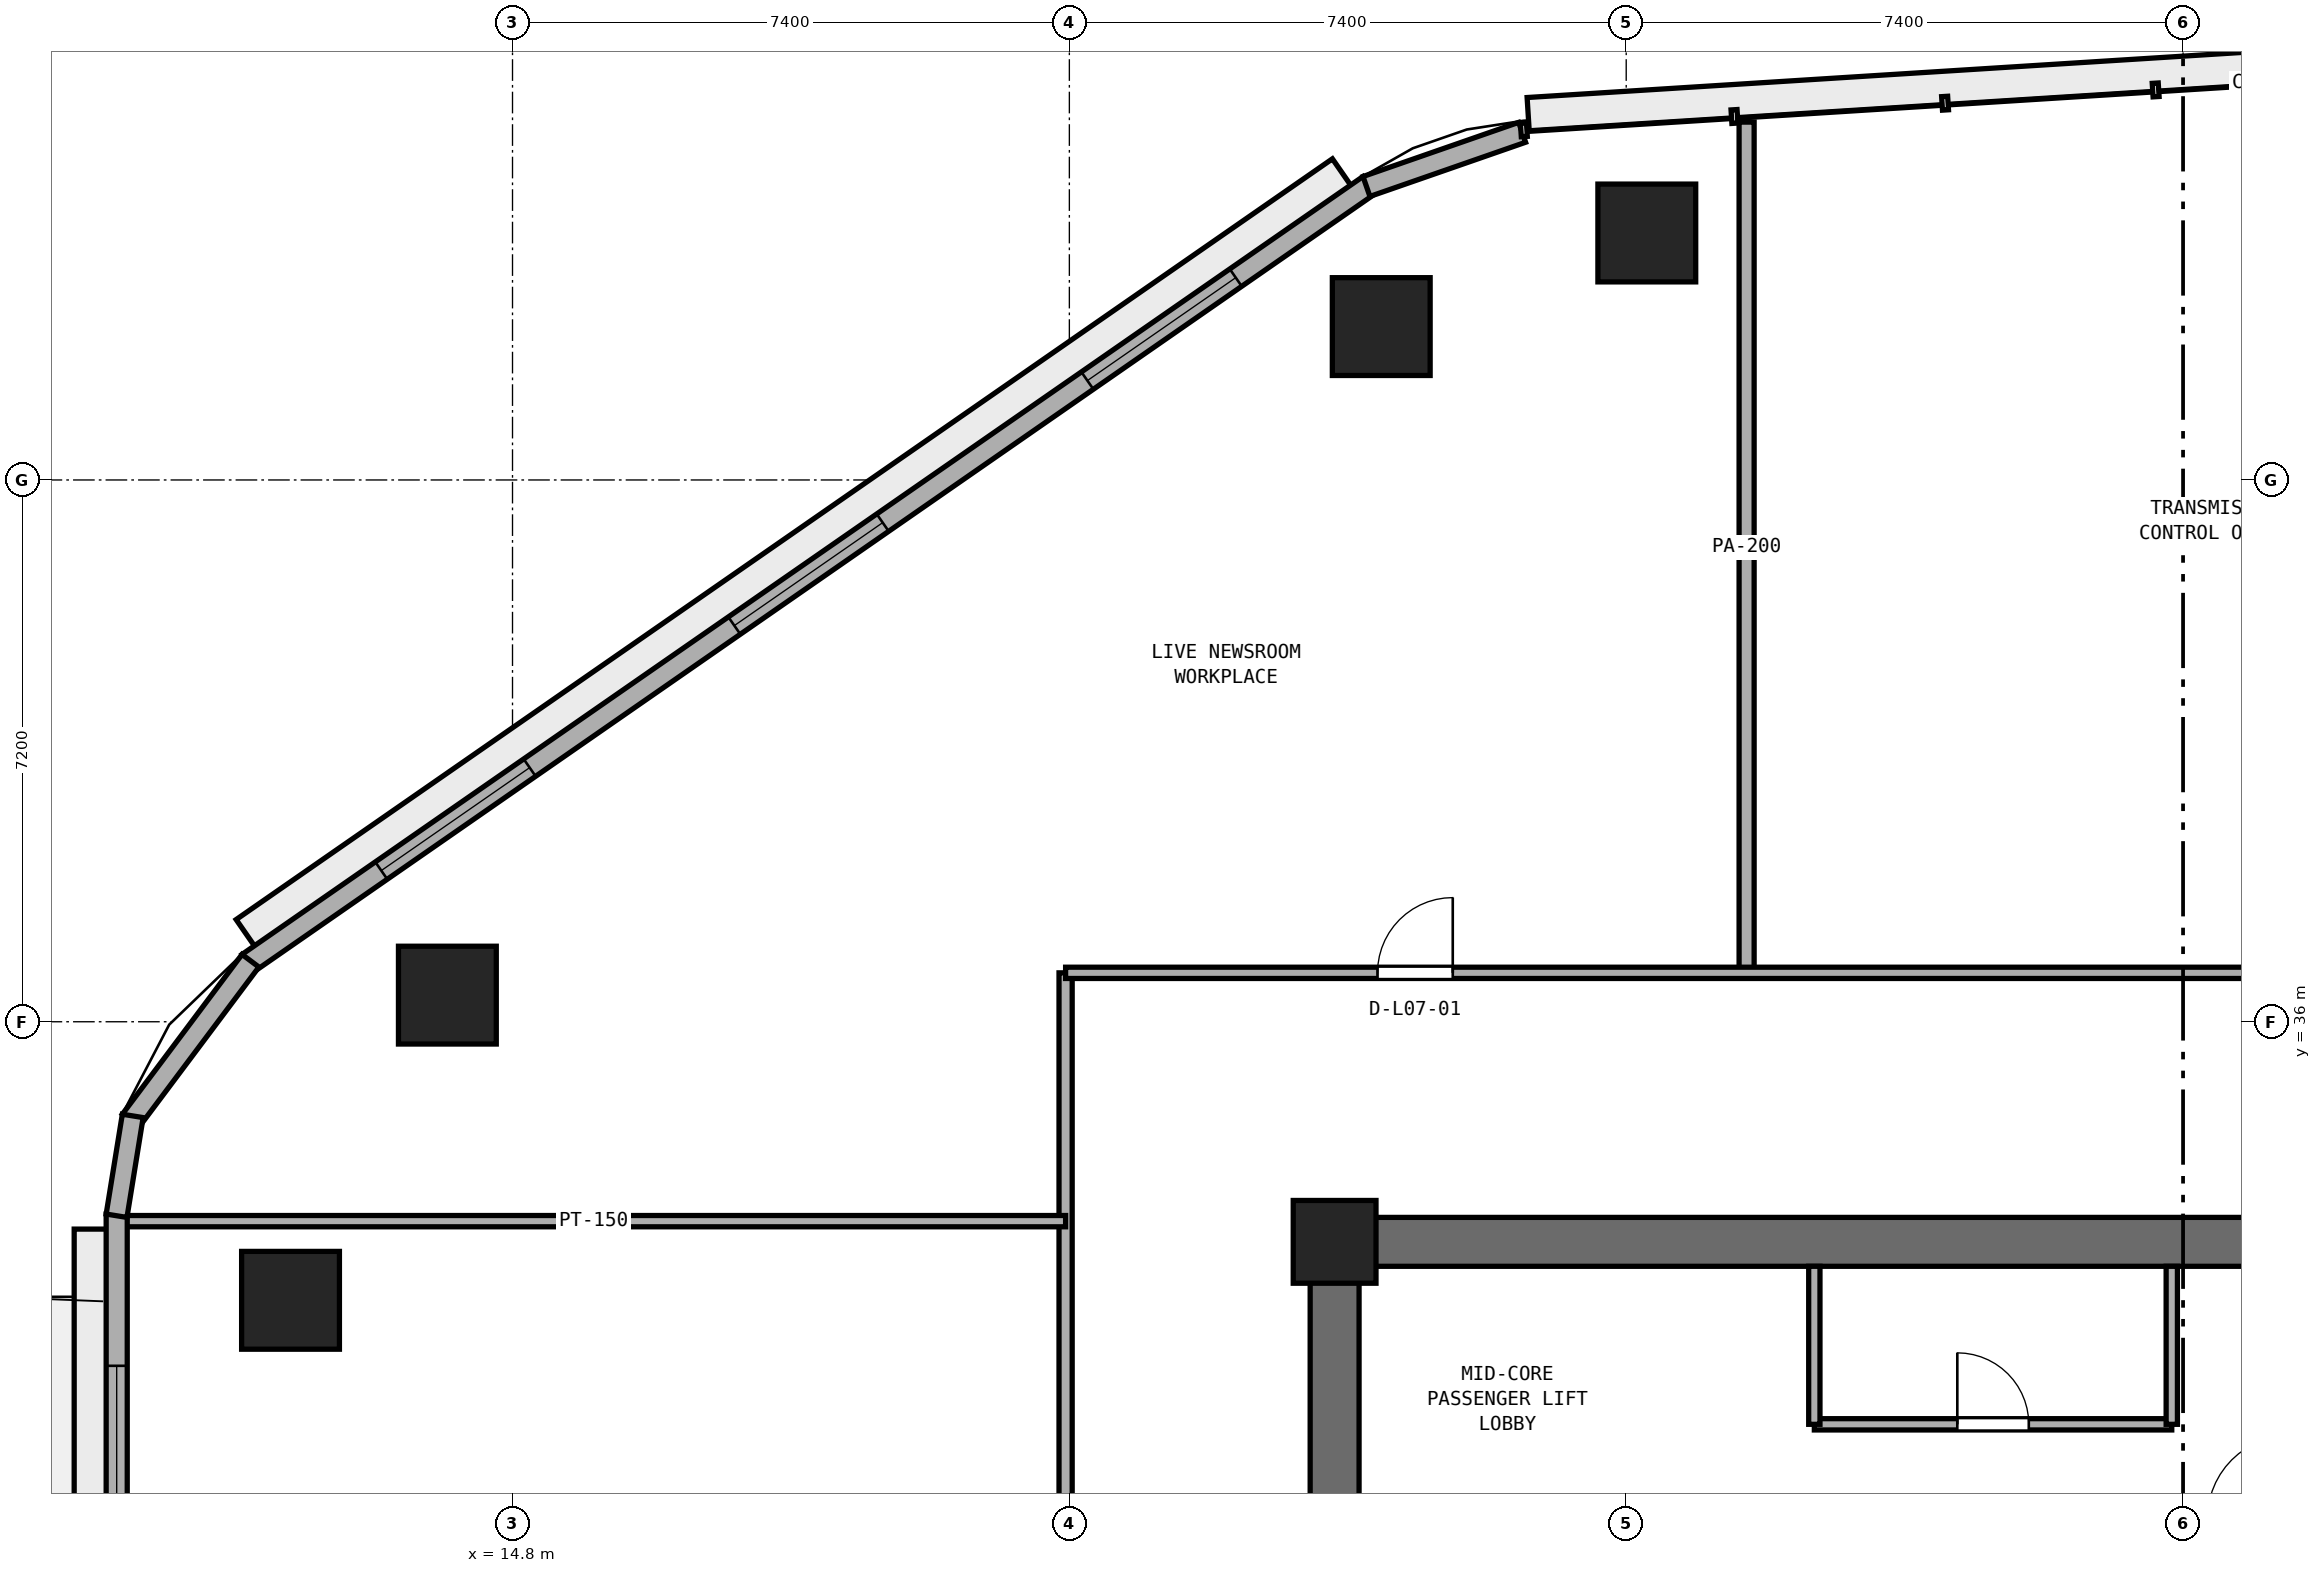
"""IFC4 building model, lengths in metres.
Left out: names, types, materials, properties, quantities, classifications, styles, units other than length and angle.
Written with IfcOpenShell. Run it as: python <this file> out.ifc"""

import sys

from ifc_helpers import new_model, si_unit, direction, frame, frame_2d, origin, origin_2d, place, context, subcontext, project, spatial, rectangle, extrude, element, fill, save


model = new_model("IFC4")
c1 = context("Model", 3, precision=1e-05, world=origin(), true_north=direction((0.0, 1.0)))
c2 = subcontext(c1, "Body", "Model", "MODEL_VIEW")
j1 = project(units=[si_unit("LENGTHUNIT", "METRE"), si_unit("PLANEANGLEUNIT", "RADIAN")], contexts=[c1])
p1 = place(None, origin())
s1 = spatial("IfcSite", under=j1, at=p1, CompositionType="ELEMENT")
p2 = place(p1, origin())
s2 = spatial("IfcBuilding", under=s1, at=p2, CompositionType="ELEMENT")
p3 = place(p2, frame((0.0, 0.0, 32.6)))
s3 = spatial("IfcBuildingStorey", under=s2, at=p3, CompositionType="ELEMENT", Elevation=32.6)
p4 = place(p3, frame((25.4, 33.075, 0.0), z_axis=(0.0, 0.0, 1.0), x_axis=(1.0, 0.0, 0.0)))
e1 = element("IfcWall", 1, at=p4, inside=s3, PredefinedType="SHEAR", context=c2, shape_type="SweptSolid", body=[
    extrude(rectangle(XDim=23.2, YDim=0.65, at=frame_2d((11.6, 0.0))), origin(), (0.0, 0.0, 1.0), 3.525),
])
p5 = place(p3, frame((25.725, 17.65, 0.0), z_axis=(0.0, 0.0, 1.0), x_axis=(0.0, 1.0, 0.0)))
e2 = element("IfcWall", 2, at=p5, inside=s3, PredefinedType="SHEAR", context=c2, shape_type="SweptSolid", body=[
    extrude(rectangle(XDim=15.1, YDim=0.65, at=frame_2d((7.55, 0.0))), origin(), (0.0, 0.0, 1.0), 3.525),
])
p6 = place(p5, frame((6.8, 0.0, 0.0)))
e3 = element("IfcOpeningElement", 3, at=p6, cuts=e2, PredefinedType="OPENING", context=c2, shape_type="SweptSolid", body=[
    extrude(rectangle(XDim=1.5, YDim=2.15, at=frame_2d((0.75, 1.075))), frame((0.0, 0.335, 0.0), z_axis=(0.0, -1.0, 0.0), x_axis=(1.0, 0.0, 0.0)), (0.0, 0.0, 1.0), 0.67),
])
p7 = place(p3, frame((25.725, 33.075, 0.0), z_axis=(0.0, 0.0, 1.0), x_axis=(1.0, 0.0, 0.0)))
e4 = element("IfcColumn", 4, at=p7, inside=s3, PredefinedType="PILASTER", context=c2, shape_type="SweptSolid", body=[
    extrude(rectangle(XDim=1.1, YDim=1.1, at=origin_2d()), origin(), (0.0, 0.0, 1.0), 3.8),
])
for number, where, z_axis, x_axis in (
    (5, (29.874, 46.482, 0.0), (0.0, 0.0, 1.0), (1.0, 0.0, 0.0)),
    (6, (26.344, 45.238, 0.0), (0.0, 0.0, 1.0), (1.0, 0.0, 0.0)),
    (7, (13.934, 36.354, 0.0), (0.0, 0.0, 1.0), (1.0, 0.0, 0.0)),
    (8, (11.85, 32.298, 0.0), (0.0, 0.0, 1.0), (1.0, 0.0, 0.0)),
):
    element("IfcColumn", number, at=place(p3, frame(where, z_axis=z_axis, x_axis=x_axis)), inside=s3, PredefinedType="COLUMN", context=c2, shape_type="SweptSolid", body=[
        extrude(rectangle(XDim=1.3, YDim=1.3, at=origin_2d()), origin(), (0.0, 0.0, 1.0), 3.8),
    ])
p8 = place(p3, frame((32.1, 30.65, 0.0), z_axis=(0.0, 0.0, 1.0), x_axis=(1.0, 0.0, 0.0)))
e9 = element("IfcWall", 9, at=p8, inside=s3, PredefinedType="PARTITIONING", context=c2, shape_type="SweptSolid", body=[
    extrude(rectangle(XDim=4.75, YDim=0.15, at=frame_2d((2.375, 0.0))), origin(), (0.0, 0.0, 1.0), 3.525),
])
p9 = place(p8, frame((1.9, 0.0, 0.0)))
e10 = element("IfcOpeningElement", 10, at=p9, cuts=e9, PredefinedType="OPENING", context=c2, shape_type="SweptSolid", body=[
    extrude(rectangle(XDim=0.95, YDim=2.1, at=frame_2d((0.475, 1.05))), frame((0.0, 0.085, 0.0), z_axis=(0.0, -1.0, 0.0), x_axis=(1.0, 0.0, 0.0)), (0.0, 0.0, 1.0), 0.17),
])
for number, where, z_axis, x_axis in (
    (11, (32.1, 30.65, 0.0), (0.0, 0.0, 1.0), (0.0, 1.0, 0.0)),
    (12, (36.85, 30.65, 0.0), (0.0, 0.0, 1.0), (0.0, 1.0, 0.0)),
):
    element("IfcWall", number, at=place(p3, frame(where, z_axis=z_axis, x_axis=x_axis)), inside=s3, PredefinedType="PARTITIONING", context=c2, shape_type="SweptSolid", body=[
        extrude(rectangle(XDim=2.1, YDim=0.15, at=frame_2d((1.05, 0.0))), origin(), (0.0, 0.0, 1.0), 3.525),
    ])
p10 = place(p3, frame((31.2, 36.65, 0.0), z_axis=(0.0, 0.0, 1.0), x_axis=(0.0, 1.0, 0.0)))
e13 = element("IfcWall", 13, at=p10, inside=s3, PredefinedType="PARTITIONING", context=c2, shape_type="SweptSolid", body=[
    extrude(rectangle(XDim=11.306, YDim=0.2, at=frame_2d((5.653, 0.0))), origin(), (0.0, 0.0, 1.0), 3.525),
])
p11 = place(p3, frame((22.15, 5.798, 0.0), z_axis=(0.0, 0.0, 1.0), x_axis=(0.0, 1.0, 0.0)))
e14 = element("IfcWall", 14, at=p11, inside=s3, PredefinedType="PARTITIONING", context=c2, shape_type="SweptSolid", body=[
    extrude(rectangle(XDim=30.852, YDim=0.175, at=frame_2d((15.426, 0.0))), origin(), (0.0, 0.0, 1.0), 3.525),
])
p12 = place(p11, frame((17.302, 0.0, 0.0)))
e15 = element("IfcOpeningElement", 15, at=p12, cuts=e14, PredefinedType="OPENING", context=c2, shape_type="SweptSolid", body=[
    extrude(rectangle(XDim=0.9, YDim=2.1, at=frame_2d((0.45, 1.05))), frame((0.0, 0.097, 0.0), z_axis=(0.0, -1.0, 0.0), x_axis=(1.0, 0.0, 0.0)), (0.0, 0.0, 1.0), 0.195),
])
p13 = place(p3, frame((9.605, 33.35, 0.0), z_axis=(0.0, 0.0, 1.0), x_axis=(1.0, 0.0, 0.0)))
e16 = element("IfcWall", 16, at=p13, inside=s3, PredefinedType="PARTITIONING", context=c2, shape_type="SweptSolid", body=[
    extrude(rectangle(XDim=12.545, YDim=0.15, at=frame_2d((6.272, 0.0))), origin(), (0.0, 0.0, 1.0), 3.525),
])
p14 = place(p3, frame((22.15, 36.65, 0.0), z_axis=(0.0, 0.0, 1.0), x_axis=(1.0, 0.0, 0.0)))
e17 = element("IfcWall", 17, at=p14, inside=s3, PredefinedType="PARTITIONING", context=c2, shape_type="SweptSolid", body=[
    extrude(rectangle(XDim=29.7, YDim=0.15, at=frame_2d((14.85, 0.0))), origin(), (0.0, 0.0, 1.0), 3.525),
])
p15 = place(p14, frame((4.145, 0.0, 0.0)))
e18 = element("IfcOpeningElement", 18, at=p15, cuts=e17, PredefinedType="OPENING", context=c2, shape_type="SweptSolid", body=[
    extrude(rectangle(XDim=1.0, YDim=2.12, at=frame_2d((0.5, 1.06))), frame((0.0, 0.085, 0.0), z_axis=(0.0, -1.0, 0.0), x_axis=(1.0, 0.0, 0.0)), (0.0, 0.0, 1.0), 0.17),
])
p16 = place(p14, frame((18.755, 0.0, 0.0)))
e19 = element("IfcOpeningElement", 19, at=p16, cuts=e17, PredefinedType="OPENING", context=c2, shape_type="SweptSolid", body=[
    extrude(rectangle(XDim=1.0, YDim=2.12, at=frame_2d((0.5, 1.06))), frame((0.0, 0.085, 0.0), z_axis=(0.0, -1.0, 0.0), x_axis=(1.0, 0.0, 0.0)), (0.0, 0.0, 1.0), 0.17),
])
p17 = place(p3, frame((26.182, 47.118, 0.0), z_axis=(0.0, 0.0, 1.0), x_axis=(-0.821547956627, -0.570139417127, 0.0)))
e20 = element("IfcWall", 20, at=p17, inside=s3, PredefinedType="STANDARD", context=c2, shape_type="SweptSolid", body=[
    extrude(rectangle(XDim=18.132, YDim=0.28, at=frame_2d((9.066, 0.0))), origin(), (0.0, 0.0, 1.0), 3.525),
])
p18 = place(p17, frame((2.156, 0.0, 0.9)))
e21 = element("IfcOpeningElement", 21, at=p18, cuts=e20, PredefinedType="OPENING", context=c2, shape_type="SweptSolid", body=[
    extrude(rectangle(XDim=2.4, YDim=1.75, at=frame_2d((1.2, 0.875))), frame((0.0, 0.15, 0.0), z_axis=(0.0, -1.0, 0.0), x_axis=(1.0, 0.0, 0.0)), (0.0, 0.0, 1.0), 0.3),
])
p19 = place(p17, frame((7.866, 0.0, 0.9)))
e22 = element("IfcOpeningElement", 22, at=p19, cuts=e20, PredefinedType="OPENING", context=c2, shape_type="SweptSolid", body=[
    extrude(rectangle(XDim=2.4, YDim=1.75, at=frame_2d((1.2, 0.875))), frame((0.0, 0.15, 0.0), z_axis=(0.0, -1.0, 0.0), x_axis=(1.0, 0.0, 0.0)), (0.0, 0.0, 1.0), 0.3),
])
p20 = place(p17, frame((13.577, 0.0, 0.9)))
e23 = element("IfcOpeningElement", 23, at=p20, cuts=e20, PredefinedType="OPENING", context=c2, shape_type="SweptSolid", body=[
    extrude(rectangle(XDim=2.4, YDim=1.75, at=frame_2d((1.2, 0.875))), frame((0.0, 0.15, 0.0), z_axis=(0.0, -1.0, 0.0), x_axis=(1.0, 0.0, 0.0)), (0.0, 0.0, 1.0), 0.3),
])
p21 = place(p3, frame((9.54, 33.444, 0.0), z_axis=(0.0, 0.0, 1.0), x_axis=(0.0, -1.0, 0.0)))
e24 = element("IfcWall", 24, at=p21, inside=s3, PredefinedType="STANDARD", context=c2, shape_type="SweptSolid", body=[
    extrude(rectangle(XDim=17.301, YDim=0.28, at=frame_2d((8.65, 0.0))), origin(), (0.0, 0.0, 1.0), 3.525),
])
p22 = place(p21, frame((8.1, 0.0, 0.0)))
e25 = element("IfcOpeningElement", 25, at=p22, cuts=e24, PredefinedType="OPENING", context=c2, shape_type="SweptSolid", body=[
    extrude(rectangle(XDim=1.1, YDim=2.2, at=frame_2d((0.55, 1.1))), frame((0.0, 0.15, 0.0), z_axis=(0.0, -1.0, 0.0), x_axis=(1.0, 0.0, 0.0)), (0.0, 0.0, 1.0), 0.3),
])
p23 = place(p21, frame((2.017, 0.0, 0.9)))
e26 = element("IfcOpeningElement", 26, at=p23, cuts=e24, PredefinedType="OPENING", context=c2, shape_type="SweptSolid", body=[
    extrude(rectangle(XDim=2.4, YDim=1.75, at=frame_2d((1.2, 0.875))), frame((0.0, 0.15, 0.0), z_axis=(0.0, -1.0, 0.0), x_axis=(1.0, 0.0, 0.0)), (0.0, 0.0, 1.0), 0.3),
])
p24 = place(p21, frame((12.884, 0.0, 0.9)))
e27 = element("IfcOpeningElement", 27, at=p24, cuts=e24, PredefinedType="OPENING", context=c2, shape_type="SweptSolid", body=[
    extrude(rectangle(XDim=2.4, YDim=1.75, at=frame_2d((1.2, 0.875))), frame((0.0, 0.15, 0.0), z_axis=(0.0, -1.0, 0.0), x_axis=(1.0, 0.0, 0.0)), (0.0, 0.0, 1.0), 0.3),
])
p25 = place(p3, frame((28.217, 47.82, 0.0), z_axis=(0.0, 0.0, 1.0), x_axis=(-0.944478751803, -0.328572499447, 0.0)))
e28 = element("IfcWall", 28, at=p25, inside=s3, PredefinedType="STANDARD", context=c2, shape_type="SweptSolid", body=[
    extrude(rectangle(XDim=2.19, YDim=0.28, at=frame_2d((1.095, 0.0))), origin(), (0.0, 0.0, 1.0), 3.525),
])
p26 = place(p3, frame((11.318, 36.811, 0.0), z_axis=(0.0, 0.0, 1.0), x_axis=(-0.599455152629, -0.800408345775, 0.0)))
e29 = element("IfcWall", 29, at=p26, inside=s3, PredefinedType="STANDARD", context=c2, shape_type="SweptSolid", body=[
    extrude(rectangle(XDim=2.653, YDim=0.28, at=frame_2d((1.327, 0.0))), origin(), (0.0, 0.0, 1.0), 3.525),
])
p27 = place(p3, frame((9.753, 34.749, 0.0), z_axis=(0.0, 0.0, 1.0), x_axis=(-0.160037671962, -0.987110907423, 0.0)))
e30 = element("IfcWall", 30, at=p27, inside=s3, PredefinedType="STANDARD", context=c2, shape_type="SweptSolid", body=[
    extrude(rectangle(XDim=1.344, YDim=0.28, at=frame_2d((0.672, 0.0))), origin(), (0.0, 0.0, 1.0), 3.525),
])
p28 = place(p9, origin())
e31 = element("IfcDoor", 31, at=p28, inside=s3, OperationType="SINGLE_SWING_LEFT", PredefinedType="DOOR", context=c2, shape_type="SweptSolid", body=[
    extrude(rectangle(XDim=0.95, YDim=2.1, at=frame_2d((0.475, 1.05))), frame((0.0, 0.025, 0.0), z_axis=(0.0, -1.0, 0.0), x_axis=(1.0, 0.0, 0.0)), (0.0, 0.0, 1.0), 0.05),
])
fill(e10, e31)
p29 = place(p15, origin())
e32 = element("IfcDoor", 32, at=p29, inside=s3, OperationType="SINGLE_SWING_RIGHT", PredefinedType="DOOR", context=c2, shape_type="SweptSolid", body=[
    extrude(rectangle(XDim=1.0, YDim=2.12, at=frame_2d((0.5, 1.06))), frame((0.0, 0.025, 0.0), z_axis=(0.0, -1.0, 0.0), x_axis=(1.0, 0.0, 0.0)), (0.0, 0.0, 1.0), 0.05),
])
fill(e18, e32)
p30 = place(p18, origin())
e33 = element("IfcWindow", 33, at=p30, inside=s3, PartitioningType="SINGLE_PANEL", PredefinedType="WINDOW", context=c2, shape_type="SweptSolid", body=[
    extrude(rectangle(XDim=2.4, YDim=1.75, at=frame_2d((1.2, 0.875))), frame((0.0, 0.03, 0.0), z_axis=(0.0, -1.0, 0.0), x_axis=(1.0, 0.0, 0.0)), (0.0, 0.0, 1.0), 0.06),
])
fill(e21, e33)
p31 = place(p19, origin())
e34 = element("IfcWindow", 34, at=p31, inside=s3, PartitioningType="SINGLE_PANEL", PredefinedType="WINDOW", context=c2, shape_type="SweptSolid", body=[
    extrude(rectangle(XDim=2.4, YDim=1.75, at=frame_2d((1.2, 0.875))), frame((0.0, 0.03, 0.0), z_axis=(0.0, -1.0, 0.0), x_axis=(1.0, 0.0, 0.0)), (0.0, 0.0, 1.0), 0.06),
])
fill(e22, e34)
p32 = place(p20, origin())
e35 = element("IfcWindow", 35, at=p32, inside=s3, PartitioningType="SINGLE_PANEL", PredefinedType="WINDOW", context=c2, shape_type="SweptSolid", body=[
    extrude(rectangle(XDim=2.4, YDim=1.75, at=frame_2d((1.2, 0.875))), frame((0.0, 0.03, 0.0), z_axis=(0.0, -1.0, 0.0), x_axis=(1.0, 0.0, 0.0)), (0.0, 0.0, 1.0), 0.06),
])
fill(e23, e35)
p33 = place(p23, origin())
e36 = element("IfcWindow", 36, at=p33, inside=s3, PartitioningType="SINGLE_PANEL", PredefinedType="WINDOW", context=c2, shape_type="SweptSolid", body=[
    extrude(rectangle(XDim=2.4, YDim=1.75, at=frame_2d((1.2, 0.875))), frame((0.0, 0.03, 0.0), z_axis=(0.0, -1.0, 0.0), x_axis=(1.0, 0.0, 0.0)), (0.0, 0.0, 1.0), 0.06),
])
fill(e26, e36)
save(model, sys.argv[1])
